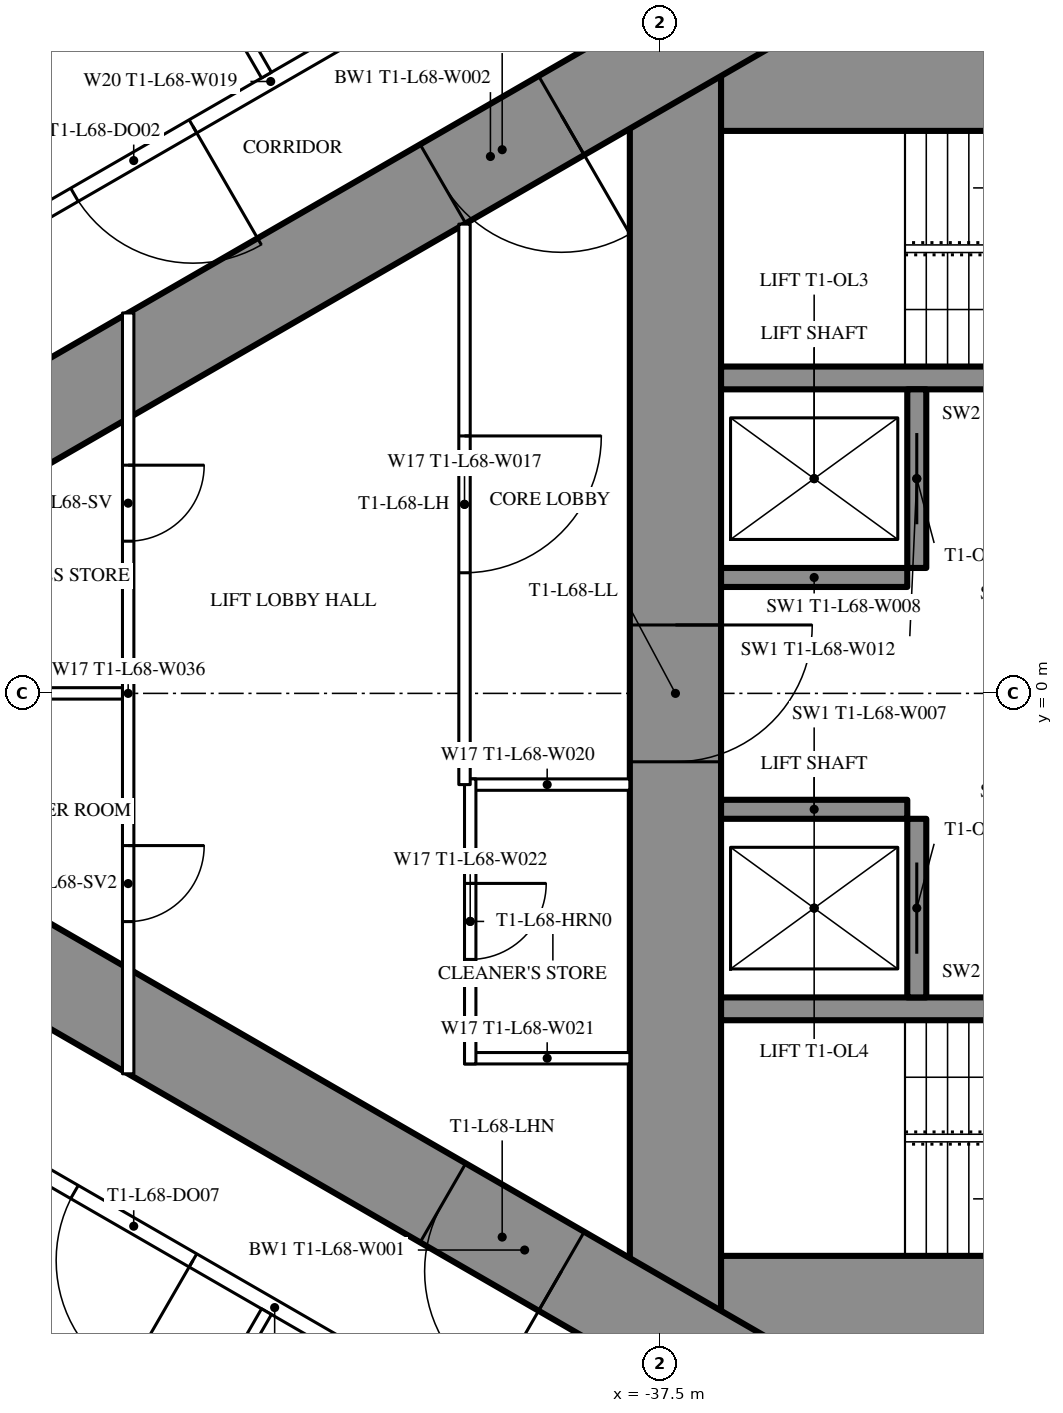
"""IFC4 building model, lengths in metres.
Left out: names, types, materials, properties, quantities, classifications, styles, units other than length and angle.
Written with IfcOpenShell. Run it as: python <this file> out.ifc"""

import sys

from ifc_helpers import new_model, si_unit, direction, frame, frame_2d, origin, place, context, subcontext, project, spatial, rectangle, extrude, element, fill, save


model = new_model("IFC4")
c1 = context("Model", 3, precision=1e-05, world=origin(), true_north=direction((0.0, 1.0)))
c2 = subcontext(c1, "Body", "Model", "MODEL_VIEW")
j1 = project(units=[si_unit("LENGTHUNIT", "METRE"), si_unit("PLANEANGLEUNIT", "RADIAN")], contexts=[c1])
p1 = place(None, origin())
s1 = spatial("IfcSite", under=j1, at=p1, CompositionType="ELEMENT")
p2 = place(p1, origin())
s2 = spatial("IfcBuilding", under=s1, at=p2, CompositionType="ELEMENT")
p3 = place(p2, frame((0.0, 0.0, 257.3)))
s3 = spatial("IfcBuildingStorey", under=s2, at=p3, CompositionType="ELEMENT", Elevation=257.3)
p4 = place(p3, frame((-37.3, 8.6, 0.0), z_axis=(0.0, 0.0, 1.0), x_axis=(0.0, -1.0, 0.0)))
e1 = element("IfcWall", 1, at=p4, inside=s3, PredefinedType="SHEAR", context=c2, shape_type="SweptSolid", body=[
    extrude(rectangle(XDim=17.2, YDim=1.2, at=frame_2d((8.6, 0.0))), origin(), (0.0, 0.0, 1.0), 6.0),
])
p5 = place(p4, frame((7.7, 0.0, 0.0)))
e2 = element("IfcOpeningElement", 2, at=p5, cuts=e1, PredefinedType="OPENING", context=c2, shape_type="SweptSolid", body=[
    extrude(rectangle(XDim=1.8, YDim=2.2, at=frame_2d((0.9, 1.1))), frame((0.0, 0.61, 0.0), z_axis=(0.0, -1.0, 0.0), x_axis=(1.0, 0.0, 0.0)), (0.0, 0.0, 1.0), 1.22),
])
p6 = place(p3, frame((-28.3, 8.0, 0.0), z_axis=(0.0, 0.0, 1.0), x_axis=(-1.0, 0.0, 0.0)))
e3 = element("IfcWall", 3, at=p6, inside=s3, PredefinedType="SHEAR", context=c2, shape_type="SweptSolid", body=[
    extrude(rectangle(XDim=8.4, YDim=1.2, at=frame_2d((4.2, 0.0))), origin(), (0.0, 0.0, 1.0), 6.0),
])
p7 = place(p6, frame((0.25, 0.0, 0.0)))
e4 = element("IfcOpeningElement", 4, at=p7, cuts=e3, PredefinedType="OPENING", context=c2, shape_type="SweptSolid", body=[
    extrude(rectangle(XDim=1.0, YDim=2.2, at=frame_2d((0.5, 1.1))), frame((0.0, 0.61, 0.0), z_axis=(0.0, -1.0, 0.0), x_axis=(1.0, 0.0, 0.0)), (0.0, 0.0, 1.0), 1.22),
])
p8 = place(p3, frame((-28.3, -8.0, 0.0), z_axis=(0.0, 0.0, 1.0), x_axis=(-1.0, 0.0, 0.0)))
e5 = element("IfcWall", 5, at=p8, inside=s3, PredefinedType="SHEAR", context=c2, shape_type="SweptSolid", body=[
    extrude(rectangle(XDim=8.4, YDim=1.2, at=frame_2d((4.2, 0.0))), origin(), (0.0, 0.0, 1.0), 6.0),
])
p9 = place(p8, frame((0.25, 0.0, 0.0)))
e6 = element("IfcOpeningElement", 6, at=p9, cuts=e5, PredefinedType="OPENING", context=c2, shape_type="SweptSolid", body=[
    extrude(rectangle(XDim=1.0, YDim=2.2, at=frame_2d((0.5, 1.1))), frame((0.0, 0.61, 0.0), z_axis=(0.0, -1.0, 0.0), x_axis=(1.0, 0.0, 0.0)), (0.0, 0.0, 1.0), 1.22),
])
for number, where, z_axis, x_axis in (
    (7, (-28.3, 4.15, 0.0), (0.0, 0.0, 1.0), (-1.0, 0.0, 0.0)),
    (8, (-28.3, -4.15, 0.0), (0.0, 0.0, 1.0), (-1.0, 0.0, 0.0)),
):
    element("IfcWall", number, at=place(p3, frame(where, z_axis=z_axis, x_axis=x_axis)), inside=s3, PredefinedType="SHEAR", context=c2, shape_type="SweptSolid", body=[
        extrude(rectangle(XDim=8.4, YDim=0.3, at=frame_2d((4.2, 0.0))), origin(), (0.0, 0.0, 1.0), 6.0),
    ])
p10 = place(p3, frame((-34.125, 4.0, 0.0), z_axis=(0.0, 0.0, 1.0), x_axis=(0.0, -1.0, 0.0)))
e9 = element("IfcWall", 9, at=p10, inside=s3, PredefinedType="SHEAR", context=c2, shape_type="SweptSolid", body=[
    extrude(rectangle(XDim=2.35, YDim=0.25, at=frame_2d((1.175, 0.0))), origin(), (0.0, 0.0, 1.0), 6.0),
])
p11 = place(p10, frame((0.575, 0.0, 0.0)))
e10 = element("IfcOpeningElement", 10, at=p11, cuts=e9, PredefinedType="OPENING", context=c2, shape_type="SweptSolid", body=[
    extrude(rectangle(XDim=1.2, YDim=2.2, at=frame_2d((0.6, 1.1))), frame((0.0, 0.135, 0.0), z_axis=(0.0, -1.0, 0.0), x_axis=(1.0, 0.0, 0.0)), (0.0, 0.0, 1.0), 0.27),
])
p12 = place(p3, frame((-34.25, 1.525, 0.0), z_axis=(0.0, 0.0, 1.0), x_axis=(-1.0, 0.0, 0.0)))
e11 = element("IfcWall", 11, at=p12, inside=s3, PredefinedType="SHEAR", context=c2, shape_type="SweptSolid", body=[
    extrude(rectangle(XDim=2.45, YDim=0.25, at=frame_2d((1.225, 0.0))), origin(), (0.0, 0.0, 1.0), 6.0),
])
p13 = place(p3, frame((-34.125, -1.65, 0.0), z_axis=(0.0, 0.0, 1.0), x_axis=(0.0, -1.0, 0.0)))
e12 = element("IfcWall", 12, at=p13, inside=s3, PredefinedType="SHEAR", context=c2, shape_type="SweptSolid", body=[
    extrude(rectangle(XDim=2.35, YDim=0.25, at=frame_2d((1.175, 0.0))), origin(), (0.0, 0.0, 1.0), 6.0),
])
p14 = place(p13, frame((0.575, 0.0, 0.0)))
e13 = element("IfcOpeningElement", 13, at=p14, cuts=e12, PredefinedType="OPENING", context=c2, shape_type="SweptSolid", body=[
    extrude(rectangle(XDim=1.2, YDim=2.2, at=frame_2d((0.6, 1.1))), frame((0.0, 0.135, 0.0), z_axis=(0.0, -1.0, 0.0), x_axis=(1.0, 0.0, 0.0)), (0.0, 0.0, 1.0), 0.27),
])
p15 = place(p3, frame((-34.25, -1.525, 0.0), z_axis=(0.0, 0.0, 1.0), x_axis=(-1.0, 0.0, 0.0)))
e14 = element("IfcWall", 14, at=p15, inside=s3, PredefinedType="SHEAR", context=c2, shape_type="SweptSolid", body=[
    extrude(rectangle(XDim=2.45, YDim=0.25, at=frame_2d((1.225, 0.0))), origin(), (0.0, 0.0, 1.0), 6.0),
])
p16 = place(p3, frame((-27.2, 14.3, 0.0), z_axis=(0.0, 0.0, 1.0), x_axis=(-0.866026593062, -0.499997940104, 0.0)))
e15 = element("IfcWall", 15, at=p16, inside=s3, PredefinedType="SHEAR", context=c2, shape_type="SweptSolid", body=[
    extrude(rectangle(XDim=28.946, YDim=1.2, at=frame_2d((14.473, 0.0))), origin(), (0.0, 0.0, 1.0), 6.0),
])
p17 = place(p16, frame((4.6, 0.0, 0.0)))
e16 = element("IfcOpeningElement", 16, at=p17, cuts=e15, PredefinedType="OPENING", context=c2, shape_type="SweptSolid", body=[
    extrude(rectangle(XDim=1.0, YDim=2.2, at=frame_2d((0.5, 1.1))), frame((0.0, 0.61, 0.0), z_axis=(0.0, -1.0, 0.0), x_axis=(1.0, 0.0, 0.0)), (0.0, 0.0, 1.0), 1.22),
])
p18 = place(p16, frame((13.395, 0.0, 0.0)))
e17 = element("IfcOpeningElement", 17, at=p18, cuts=e15, PredefinedType="OPENING", context=c2, shape_type="SweptSolid", body=[
    extrude(rectangle(XDim=1.8, YDim=2.2, at=frame_2d((0.9, 1.1))), frame((0.0, 0.61, 0.0), z_axis=(0.0, -1.0, 0.0), x_axis=(1.0, 0.0, 0.0)), (0.0, 0.0, 1.0), 1.22),
])
p19 = place(p3, frame((-27.2, -14.3, 0.0), z_axis=(0.0, 0.0, 1.0), x_axis=(-0.866024021859, 0.500002393557, 0.0)))
e18 = element("IfcWall", 18, at=p19, inside=s3, PredefinedType="SHEAR", context=c2, shape_type="SweptSolid", body=[
    extrude(rectangle(XDim=27.907, YDim=1.2, at=frame_2d((13.954, 0.0))), origin(), (0.0, 0.0, 1.0), 6.0),
])
p20 = place(p19, frame((4.6, 0.0, 0.0)))
e19 = element("IfcOpeningElement", 19, at=p20, cuts=e18, PredefinedType="OPENING", context=c2, shape_type="SweptSolid", body=[
    extrude(rectangle(XDim=1.0, YDim=2.2, at=frame_2d((0.5, 1.1))), frame((0.0, 0.61, 0.0), z_axis=(0.0, -1.0, 0.0), x_axis=(1.0, 0.0, 0.0)), (0.0, 0.0, 1.0), 1.22),
])
p21 = place(p19, frame((13.395, 0.0, 0.0)))
e20 = element("IfcOpeningElement", 20, at=p21, cuts=e18, PredefinedType="OPENING", context=c2, shape_type="SweptSolid", body=[
    extrude(rectangle(XDim=1.8, YDim=2.2, at=frame_2d((0.9, 1.1))), frame((0.0, 0.61, 0.0), z_axis=(0.0, -1.0, 0.0), x_axis=(1.0, 0.0, 0.0)), (0.0, 0.0, 1.0), 1.22),
])
p22 = place(p3, frame((-28.681, 16.101, 0.0), z_axis=(0.0, 0.0, 1.0), x_axis=(-0.866024860443, -0.500000941094, 0.0)))
e21 = element("IfcWall", 21, at=p22, inside=s3, PredefinedType="PARTITIONING", context=c2, shape_type="SweptSolid", body=[
    extrude(rectangle(XDim=32.201, YDim=0.2, at=frame_2d((16.101, 0.0))), origin(), (0.0, 0.0, 1.0), 5.75),
])
p23 = place(p22, frame((7.166, 0.0, 0.0)))
e22 = element("IfcOpeningElement", 22, at=p23, cuts=e21, PredefinedType="OPENING", context=c2, shape_type="SweptSolid", body=[
    extrude(rectangle(XDim=2.0, YDim=2.4, at=frame_2d((1.0, 1.2))), frame((0.0, 0.11, 0.0), z_axis=(0.0, -1.0, 0.0), x_axis=(1.0, 0.0, 0.0)), (0.0, 0.0, 1.0), 0.22),
])
p24 = place(p22, frame((17.281, 0.0, 0.0)))
e23 = element("IfcOpeningElement", 23, at=p24, cuts=e21, PredefinedType="OPENING", context=c2, shape_type="SweptSolid", body=[
    extrude(rectangle(XDim=1.8, YDim=2.2, at=frame_2d((0.9, 1.1))), frame((0.0, 0.11, 0.0), z_axis=(0.0, -1.0, 0.0), x_axis=(1.0, 0.0, 0.0)), (0.0, 0.0, 1.0), 0.22),
])
p25 = place(p22, frame((21.43, 0.0, 0.0)))
e24 = element("IfcOpeningElement", 24, at=p25, cuts=e21, PredefinedType="OPENING", context=c2, shape_type="SweptSolid", body=[
    extrude(rectangle(XDim=1.8, YDim=2.2, at=frame_2d((0.9, 1.1))), frame((0.0, 0.11, 0.0), z_axis=(0.0, -1.0, 0.0), x_axis=(1.0, 0.0, 0.0)), (0.0, 0.0, 1.0), 0.22),
])
p26 = place(p22, frame((27.19, 0.0, 0.0)))
e25 = element("IfcOpeningElement", 25, at=p26, cuts=e21, PredefinedType="OPENING", context=c2, shape_type="SweptSolid", body=[
    extrude(rectangle(XDim=2.0, YDim=2.4, at=frame_2d((1.0, 1.2))), frame((0.0, 0.11, 0.0), z_axis=(0.0, -1.0, 0.0), x_axis=(1.0, 0.0, 0.0)), (0.0, 0.0, 1.0), 0.22),
])
p27 = place(p3, frame((-28.681, -16.101, 0.0), z_axis=(0.0, 0.0, 1.0), x_axis=(-0.86602501917, 0.50000066617, 0.0)))
e26 = element("IfcWall", 26, at=p27, inside=s3, PredefinedType="PARTITIONING", context=c2, shape_type="SweptSolid", body=[
    extrude(rectangle(XDim=32.081, YDim=0.2, at=frame_2d((16.041, 0.0))), origin(), (0.0, 0.0, 1.0), 5.75),
])
p28 = place(p27, frame((27.13, 0.0, 0.0)))
e27 = element("IfcOpeningElement", 27, at=p28, cuts=e26, PredefinedType="OPENING", context=c2, shape_type="SweptSolid", body=[
    extrude(rectangle(XDim=2.0, YDim=2.4, at=frame_2d((1.0, 1.2))), frame((0.0, 0.11, 0.0), z_axis=(0.0, -1.0, 0.0), x_axis=(1.0, 0.0, 0.0)), (0.0, 0.0, 1.0), 0.22),
])
p29 = place(p27, frame((21.43, 0.0, 0.0)))
e28 = element("IfcOpeningElement", 28, at=p29, cuts=e26, PredefinedType="OPENING", context=c2, shape_type="SweptSolid", body=[
    extrude(rectangle(XDim=1.8, YDim=2.2, at=frame_2d((0.9, 1.1))), frame((0.0, 0.11, 0.0), z_axis=(0.0, -1.0, 0.0), x_axis=(1.0, 0.0, 0.0)), (0.0, 0.0, 1.0), 0.22),
])
p30 = place(p27, frame((17.281, 0.0, 0.0)))
e29 = element("IfcOpeningElement", 29, at=p30, cuts=e26, PredefinedType="OPENING", context=c2, shape_type="SweptSolid", body=[
    extrude(rectangle(XDim=1.8, YDim=2.2, at=frame_2d((0.9, 1.1))), frame((0.0, 0.11, 0.0), z_axis=(0.0, -1.0, 0.0), x_axis=(1.0, 0.0, 0.0)), (0.0, 0.0, 1.0), 0.22),
])
p31 = place(p27, frame((7.166, 0.0, 0.0)))
e30 = element("IfcOpeningElement", 30, at=p31, cuts=e26, PredefinedType="OPENING", context=c2, shape_type="SweptSolid", body=[
    extrude(rectangle(XDim=2.0, YDim=2.4, at=frame_2d((1.0, 1.2))), frame((0.0, 0.11, 0.0), z_axis=(0.0, -1.0, 0.0), x_axis=(1.0, 0.0, 0.0)), (0.0, 0.0, 1.0), 0.22),
])
for number, where, z_axis, x_axis in (
    (31, (-42.68, 8.134, 0.0), (0.0, 0.0, 1.0), (-0.5, 0.866, 0.0)),
    (32, (-42.68, -8.134, 0.0), (0.0, 0.0, 1.0), (-0.5, -0.866, 0.0)),
):
    element("IfcWall", number, at=place(p3, frame(where, z_axis=z_axis, x_axis=x_axis)), inside=s3, PredefinedType="PARTITIONING", context=c2, shape_type="SweptSolid", body=[
        extrude(rectangle(XDim=5.995, YDim=0.15, at=frame_2d((2.998, 0.0))), origin(), (0.0, 0.0, 1.0), 4.85),
    ])
for number, where, z_axis, x_axis in (
    (33, (-37.9, -1.2, 0.0), (0.0, 0.0, 1.0), (-1.0, 0.0, 0.0)),
    (34, (-37.9, -4.8, 0.0), (0.0, 0.0, 1.0), (-1.0, 0.0, 0.0)),
):
    element("IfcWall", number, at=place(p3, frame(where, z_axis=z_axis, x_axis=x_axis)), inside=s3, PredefinedType="PARTITIONING", context=c2, shape_type="SweptSolid", body=[
        extrude(rectangle(XDim=2.175, YDim=0.15, at=frame_2d((1.087, 0.0))), origin(), (0.0, 0.0, 1.0), 5.75),
    ])
p32 = place(p3, frame((-40.0, -1.125, 0.0), z_axis=(0.0, 0.0, 1.0), x_axis=(0.0, -1.0, 0.0)))
e35 = element("IfcWall", 35, at=p32, inside=s3, PredefinedType="PARTITIONING", context=c2, shape_type="SweptSolid", body=[
    extrude(rectangle(XDim=3.75, YDim=0.15, at=frame_2d((1.875, 0.0))), origin(), (0.0, 0.0, 1.0), 5.75),
])
p33 = place(p32, frame((1.375, 0.0, 0.0)))
e36 = element("IfcOpeningElement", 36, at=p33, cuts=e35, PredefinedType="OPENING", context=c2, shape_type="SweptSolid", body=[
    extrude(rectangle(XDim=1.0, YDim=2.2, at=frame_2d((0.5, 1.1))), frame((0.0, 0.085, 0.0), z_axis=(0.0, -1.0, 0.0), x_axis=(1.0, 0.0, 0.0)), (0.0, 0.0, 1.0), 0.17),
])
p34 = place(p3, frame((-40.075, 6.174, 0.0), z_axis=(0.0, 0.0, 1.0), x_axis=(0.0, -1.0, 0.0)))
e37 = element("IfcWall", 37, at=p34, inside=s3, PredefinedType="PARTITIONING", context=c2, shape_type="SweptSolid", body=[
    extrude(rectangle(XDim=7.374, YDim=0.15, at=frame_2d((3.687, 0.0))), origin(), (0.0, 0.0, 1.0), 5.75),
])
p35 = place(p34, frame((2.787, 0.0, 0.0)))
e38 = element("IfcOpeningElement", 38, at=p35, cuts=e37, PredefinedType="OPENING", context=c2, shape_type="SweptSolid", body=[
    extrude(rectangle(XDim=1.8, YDim=2.2, at=frame_2d((0.9, 1.1))), frame((0.0, 0.085, 0.0), z_axis=(0.0, -1.0, 0.0), x_axis=(1.0, 0.0, 0.0)), (0.0, 0.0, 1.0), 0.17),
])
p36 = place(p3, frame((-44.5, 5.005, 0.0), z_axis=(0.0, 0.0, 1.0), x_axis=(0.0, -1.0, 0.0)))
e39 = element("IfcWall", 39, at=p36, inside=s3, PredefinedType="PARTITIONING", context=c2, shape_type="SweptSolid", body=[
    extrude(rectangle(XDim=10.009, YDim=0.15, at=frame_2d((5.005, 0.0))), origin(), (0.0, 0.0, 1.0), 4.9),
])
p37 = place(p36, frame((2.002, 0.0, 0.0)))
e40 = element("IfcOpeningElement", 40, at=p37, cuts=e39, PredefinedType="OPENING", context=c2, shape_type="SweptSolid", body=[
    extrude(rectangle(XDim=1.0, YDim=2.2, at=frame_2d((0.5, 1.1))), frame((0.0, 0.085, 0.0), z_axis=(0.0, -1.0, 0.0), x_axis=(1.0, 0.0, 0.0)), (0.0, 0.0, 1.0), 0.17),
])
p38 = place(p36, frame((7.007, 0.0, 0.0)))
e41 = element("IfcOpeningElement", 41, at=p38, cuts=e39, PredefinedType="OPENING", context=c2, shape_type="SweptSolid", body=[
    extrude(rectangle(XDim=1.0, YDim=2.2, at=frame_2d((0.5, 1.1))), frame((0.0, 0.085, 0.0), z_axis=(0.0, -1.0, 0.0), x_axis=(1.0, 0.0, 0.0)), (0.0, 0.0, 1.0), 0.17),
])
p39 = place(p3, frame((-44.575, 0.0, 0.0), z_axis=(0.0, 0.0, 1.0), x_axis=(-1.0, 0.0, 0.0)))
e42 = element("IfcWall", 42, at=p39, inside=s3, PredefinedType="PARTITIONING", context=c2, shape_type="SweptSolid", body=[
    extrude(rectangle(XDim=8.593, YDim=0.15, at=frame_2d((4.297, 0.0))), origin(), (0.0, 0.0, 1.0), 4.85),
])
p40 = place(p24, origin())
e43 = element("IfcDoor", 43, at=p40, inside=s3, OperationType="DOUBLE_DOOR_SINGLE_SWING", PredefinedType="DOOR", context=c2, shape_type="SweptSolid", body=[
    extrude(rectangle(XDim=1.8, YDim=2.2, at=frame_2d((0.9, 1.1))), frame((0.0, 0.025, 0.0), z_axis=(0.0, -1.0, 0.0), x_axis=(1.0, 0.0, 0.0)), (0.0, 0.0, 1.0), 0.05),
])
fill(e23, e43)
p41 = place(p30, origin())
e44 = element("IfcDoor", 44, at=p41, inside=s3, OperationType="DOUBLE_DOOR_SINGLE_SWING", PredefinedType="DOOR", context=c2, shape_type="SweptSolid", body=[
    extrude(rectangle(XDim=1.8, YDim=2.2, at=frame_2d((0.9, 1.1))), frame((0.0, 0.025, 0.0), z_axis=(0.0, -1.0, 0.0), x_axis=(1.0, 0.0, 0.0)), (0.0, 0.0, 1.0), 0.05),
])
fill(e29, e44)
p42 = place(p33, origin())
e45 = element("IfcDoor", 45, at=p42, inside=s3, OperationType="SINGLE_SWING_LEFT", PredefinedType="DOOR", context=c2, shape_type="SweptSolid", body=[
    extrude(rectangle(XDim=1.0, YDim=2.2, at=frame_2d((0.5, 1.1))), frame((0.0, 0.025, 0.0), z_axis=(0.0, -1.0, 0.0), x_axis=(1.0, 0.0, 0.0)), (0.0, 0.0, 1.0), 0.05),
])
fill(e36, e45)
p43 = place(p35, origin())
e46 = element("IfcDoor", 46, at=p43, inside=s3, OperationType="DOUBLE_DOOR_SINGLE_SWING", PredefinedType="DOOR", context=c2, shape_type="SweptSolid", body=[
    extrude(rectangle(XDim=1.8, YDim=2.2, at=frame_2d((0.9, 1.1))), frame((0.0, 0.025, 0.0), z_axis=(0.0, -1.0, 0.0), x_axis=(1.0, 0.0, 0.0)), (0.0, 0.0, 1.0), 0.05),
])
fill(e38, e46)
p44 = place(p37, origin())
e47 = element("IfcDoor", 47, at=p44, inside=s3, OperationType="SINGLE_SWING_LEFT", PredefinedType="DOOR", context=c2, shape_type="SweptSolid", body=[
    extrude(rectangle(XDim=1.0, YDim=2.2, at=frame_2d((0.5, 1.1))), frame((0.0, 0.025, 0.0), z_axis=(0.0, -1.0, 0.0), x_axis=(1.0, 0.0, 0.0)), (0.0, 0.0, 1.0), 0.05),
])
fill(e40, e47)
p45 = place(p38, origin())
e48 = element("IfcDoor", 48, at=p45, inside=s3, OperationType="SINGLE_SWING_LEFT", PredefinedType="DOOR", context=c2, shape_type="SweptSolid", body=[
    extrude(rectangle(XDim=1.0, YDim=2.2, at=frame_2d((0.5, 1.1))), frame((0.0, 0.025, 0.0), z_axis=(0.0, -1.0, 0.0), x_axis=(1.0, 0.0, 0.0)), (0.0, 0.0, 1.0), 0.05),
])
fill(e41, e48)
p46 = place(p18, origin())
e49 = element("IfcDoor", 49, at=p46, inside=s3, OperationType="DOUBLE_DOOR_SINGLE_SWING", PredefinedType="DOOR", context=c2, shape_type="SweptSolid", body=[
    extrude(rectangle(XDim=1.8, YDim=2.2, at=frame_2d((0.9, 1.1))), frame((0.0, 0.025, 0.0), z_axis=(0.0, -1.0, 0.0), x_axis=(1.0, 0.0, 0.0)), (0.0, 0.0, 1.0), 0.05),
])
fill(e17, e49)
p47 = place(p21, origin())
e50 = element("IfcDoor", 50, at=p47, inside=s3, OperationType="DOUBLE_DOOR_SINGLE_SWING", PredefinedType="DOOR", context=c2, shape_type="SweptSolid", body=[
    extrude(rectangle(XDim=1.8, YDim=2.2, at=frame_2d((0.9, 1.1))), frame((0.0, 0.025, 0.0), z_axis=(0.0, -1.0, 0.0), x_axis=(1.0, 0.0, 0.0)), (0.0, 0.0, 1.0), 0.05),
])
fill(e20, e50)
p48 = place(p5, origin())
e51 = element("IfcDoor", 51, at=p48, inside=s3, OperationType="DOUBLE_DOOR_SINGLE_SWING", PredefinedType="DOOR", context=c2, shape_type="SweptSolid", body=[
    extrude(rectangle(XDim=1.8, YDim=2.2, at=frame_2d((0.9, 1.1))), frame((0.0, 0.025, 0.0), z_axis=(0.0, -1.0, 0.0), x_axis=(1.0, 0.0, 0.0)), (0.0, 0.0, 1.0), 0.05),
])
fill(e2, e51)
p49 = place(p11, origin())
e52 = element("IfcDoor", 52, at=p49, inside=s3, OperationType="DOUBLE_DOOR_SLIDING", PredefinedType="USERDEFINED", context=c2, shape_type="SweptSolid", body=[
    extrude(rectangle(XDim=1.2, YDim=2.2, at=frame_2d((0.6, 1.1))), frame((0.0, 0.025, 0.0), z_axis=(0.0, -1.0, 0.0), x_axis=(1.0, 0.0, 0.0)), (0.0, 0.0, 1.0), 0.05),
])
fill(e10, e52)
p50 = place(p14, origin())
e53 = element("IfcDoor", 53, at=p50, inside=s3, OperationType="DOUBLE_DOOR_SLIDING", PredefinedType="USERDEFINED", context=c2, shape_type="SweptSolid", body=[
    extrude(rectangle(XDim=1.2, YDim=2.2, at=frame_2d((0.6, 1.1))), frame((0.0, 0.025, 0.0), z_axis=(0.0, -1.0, 0.0), x_axis=(1.0, 0.0, 0.0)), (0.0, 0.0, 1.0), 0.05),
])
fill(e13, e53)
save(model, sys.argv[1])
